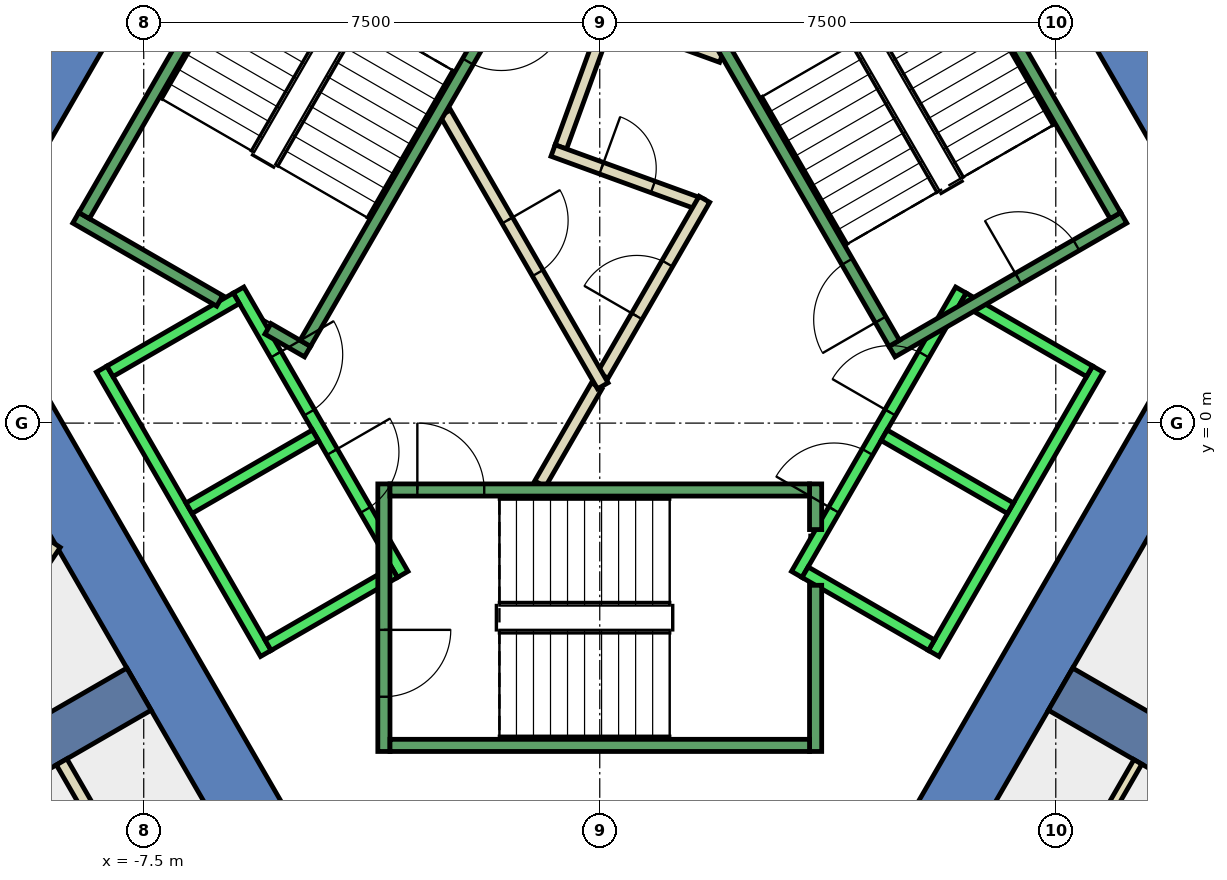
"""IFC4 building model, lengths in metres.
Left out: names, types, materials, properties, quantities, classifications, styles, units other than length and angle.
Written with IfcOpenShell. Run it as: python <this file> out.ifc"""

import sys

from ifc_helpers import new_model, si_unit, direction, frame, frame_2d, origin, place, context, subcontext, project, spatial, polyline, rectangle, outline, extrude, element, fill, save


model = new_model("IFC4")
c1 = context("Model", 3, precision=1e-05, world=origin(), true_north=direction((0.0, 1.0)))
c2 = subcontext(c1, "Body", "Model", "MODEL_VIEW")
j1 = project(units=[si_unit("LENGTHUNIT", "METRE"), si_unit("PLANEANGLEUNIT", "RADIAN")], contexts=[c1])
p1 = place(None, origin())
s1 = spatial("IfcSite", under=j1, at=p1, CompositionType="ELEMENT")
p2 = place(p1, origin())
s2 = spatial("IfcBuilding", under=s1, at=p2, CompositionType="ELEMENT")
p3 = place(p2, frame((0.0, 0.0, 273.8)))
s3 = spatial("IfcBuildingStorey", under=s2, at=p3, CompositionType="ELEMENT", Elevation=273.8)
p4 = place(p3, frame((0.0, 0.0, -0.34)))
e1 = element("IfcWall", 1, at=p4, inside=s3, PredefinedType="SHEAR", context=c2, shape_type="SweptSolid", body=[
    extrude(outline(polyline([(6.786, 10.747), (5.833, 10.197), (10.277, 2.5), (11.547, 2.5), (6.786, 10.747)])), origin(), (0.0, 0.0, 1.0), 3.6),
])
p5 = place(p3, frame((0.0, 0.0, -0.34)))
e2 = element("IfcWall", 2, at=p5, inside=s3, PredefinedType="SHEAR", context=c2, shape_type="SweptSolid", body=[
    extrude(outline(polyline([(-10.535, 4.253), (-9.583, 3.703), (-5.138, 11.4), (-5.774, 12.5), (-10.535, 4.253)])), origin(), (0.0, 0.0, 1.0), 3.6),
])
p6 = place(p3, frame((0.0, 0.0, -0.34)))
e3 = element("IfcWall", 3, at=p6, inside=s3, PredefinedType="SHEAR", context=c2, shape_type="SweptSolid", body=[
    extrude(outline(polyline([(-11.547, 2.5), (-5.774, -7.5), (-5.138, -6.4), (-10.277, 2.5), (-11.547, 2.5)])), origin(), (0.0, 0.0, 1.0), 3.6),
])
p7 = place(p3, frame((0.0, 0.0, -0.34)))
e4 = element("IfcWall", 4, at=p7, inside=s3, PredefinedType="SHEAR", context=c2, shape_type="SweptSolid", body=[
    extrude(outline(polyline([(5.774, -7.5), (11.547, 2.5), (10.277, 2.5), (5.138, -6.4), (5.774, -7.5)])), origin(), (0.0, 0.0, 1.0), 3.6),
])
for number, where, z_axis, x_axis in (
    (5, (7.578, -4.375, -0.34), (0.0, 0.0, 1.0), (0.866, -0.5, 0.0)),
    (6, (-7.578, -4.375, -0.34), (0.0, 0.0, 1.0), (-0.866, -0.5, 0.0)),
):
    element("IfcWall", number, at=place(p3, frame(where, z_axis=z_axis, x_axis=x_axis)), inside=s3, PredefinedType="SHEAR", context=c2, shape_type="SweptSolid", body=[
        extrude(rectangle(XDim=9.0, YDim=0.8, at=frame_2d((4.5, 0.0))), origin(), (0.0, 0.0, 1.0), 3.6),
    ])
p8 = place(p3, frame((2.005, 6.027, 0.0), z_axis=(0.0, 0.0, 1.0), x_axis=(-0.93978203596, 0.341774377167, 0.0)))
e7 = element("IfcWall", 7, at=p8, inside=s3, PredefinedType="PARTITIONING", context=c2, shape_type="SweptSolid", body=[
    extrude(rectangle(XDim=1.878, YDim=0.2, at=frame_2d((0.939, 0.0))), origin(), (0.0, 0.0, 1.0), 3.26),
])
p9 = place(p3, frame((0.181, 6.797, 0.0), z_axis=(0.0, 0.0, 1.0), x_axis=(-0.342020767299, -0.939692393678, 0.0)))
e8 = element("IfcWall", 8, at=p9, inside=s3, PredefinedType="PARTITIONING", context=c2, shape_type="SweptSolid", body=[
    extrude(rectangle(XDim=2.4, YDim=0.2, at=frame_2d((1.2, 0.0))), origin(), (0.0, 0.0, 1.0), 3.26),
])
p10 = place(p3, frame((-0.768, 4.482, 0.0), z_axis=(0.0, 0.0, 1.0), x_axis=(0.939664280748, -0.342097996905, 0.0)))
e9 = element("IfcWall", 9, at=p10, inside=s3, PredefinedType="PARTITIONING", context=c2, shape_type="SweptSolid", body=[
    extrude(rectangle(XDim=2.595, YDim=0.2, at=frame_2d((1.298, 0.0))), origin(), (0.0, 0.0, 1.0), 3.26),
])
p11 = place(p10, frame((0.848, 0.0, 0.0)))
e10 = element("IfcOpeningElement", 10, at=p11, cuts=e9, PredefinedType="OPENING", context=c2, shape_type="SweptSolid", body=[
    extrude(rectangle(XDim=0.9, YDim=2.1, at=frame_2d((0.45, 1.05))), frame((0.0, 0.11, 0.0), z_axis=(0.0, -1.0, 0.0), x_axis=(1.0, 0.0, 0.0)), (0.0, 0.0, 1.0), 0.22),
])
p12 = place(p3, frame((-10.028, -3.575, 0.0), z_axis=(0.0, 0.0, 1.0), x_axis=(0.559779346026, 0.828641710127, 0.0)))
e11 = element("IfcWall", 11, at=p12, inside=s3, PredefinedType="PARTITIONING", context=c2, shape_type="SweptSolid", body=[
    extrude(rectangle(XDim=1.915, YDim=0.2, at=frame_2d((0.958, 0.0))), origin(), (0.0, 0.0, 1.0), 3.26),
])
p13 = place(p3, frame((7.8, -7.39, 0.0), z_axis=(0.0, 0.0, 1.0), x_axis=(0.499977374825, 0.866038466041, 0.0)))
e12 = element("IfcWall", 12, at=p13, inside=s3, PredefinedType="PARTITIONING", context=c2, shape_type="SweptSolid", body=[
    extrude(rectangle(XDim=2.1, YDim=0.15, at=frame_2d((1.05, 0.0))), origin(), (0.0, 0.0, 1.0), 3.26),
])
p14 = place(p3, frame((-0.982, -1.0, 0.0), z_axis=(0.0, 0.0, 1.0), x_axis=(0.50024047865, 0.865886518847, 0.0)))
e13 = element("IfcWall", 13, at=p14, inside=s3, PredefinedType="PARTITIONING", context=c2, shape_type="SweptSolid", body=[
    extrude(rectangle(XDim=1.863, YDim=0.2, at=frame_2d((0.931, 0.0))), origin(), (0.0, 0.0, 1.0), 3.26),
])
p15 = place(p3, frame((0.05, 0.787, 0.0), z_axis=(0.0, 0.0, 1.0), x_axis=(0.500036563046, 0.866004293071, 0.0)))
e14 = element("IfcWall", 14, at=p15, inside=s3, PredefinedType="PARTITIONING", context=c2, shape_type="SweptSolid", body=[
    extrude(rectangle(XDim=3.342, YDim=0.2, at=frame_2d((1.671, 0.0))), origin(), (0.0, 0.0, 1.0), 3.26),
])
p16 = place(p15, frame((1.121, 0.0, 0.0)))
e15 = element("IfcOpeningElement", 15, at=p16, cuts=e14, PredefinedType="OPENING", context=c2, shape_type="SweptSolid", body=[
    extrude(rectangle(XDim=1.0, YDim=2.1, at=frame_2d((0.5, 1.05))), frame((0.0, 0.11, 0.0), z_axis=(0.0, -1.0, 0.0), x_axis=(1.0, 0.0, 0.0)), (0.0, 0.0, 1.0), 0.22),
])
p17 = place(p3, frame((-2.54, 5.1, 0.0), z_axis=(0.0, 0.0, 1.0), x_axis=(0.499925051871, -0.866068670783, 0.0)))
e16 = element("IfcWall", 16, at=p17, inside=s3, PredefinedType="PARTITIONING", context=c2, shape_type="SweptSolid", body=[
    extrude(rectangle(XDim=5.181, YDim=0.2, at=frame_2d((2.59, 0.0))), origin(), (0.0, 0.0, 1.0), 3.26),
])
p18 = place(p17, frame((2.04, 0.0, 0.0)))
e17 = element("IfcOpeningElement", 17, at=p18, cuts=e16, PredefinedType="OPENING", context=c2, shape_type="SweptSolid", body=[
    extrude(rectangle(XDim=1.0, YDim=2.1, at=frame_2d((0.5, 1.05))), frame((0.0, 0.11, 0.0), z_axis=(0.0, -1.0, 0.0), x_axis=(1.0, 0.0, 0.0)), (0.0, 0.0, 1.0), 0.22),
])
p19 = place(p3, frame((-7.8, -7.39, 0.0), z_axis=(0.0, 0.0, 1.0), x_axis=(-0.499977374825, 0.866038466041, 0.0)))
e18 = element("IfcWall", 18, at=p19, inside=s3, PredefinedType="PARTITIONING", context=c2, shape_type="SweptSolid", body=[
    extrude(rectangle(XDim=2.1, YDim=0.2, at=frame_2d((1.05, 0.0))), origin(), (0.0, 0.0, 1.0), 3.26),
])
p20 = place(p3, frame((-5.94, 2.188, 0.0), z_axis=(0.0, 0.0, 1.0), x_axis=(0.500034260056, -0.866005622828, 0.0)))
e19 = element("IfcWall", 19, at=p20, inside=s3, PredefinedType="STANDARD", context=c2, shape_type="SweptSolid", body=[
    extrude(rectangle(XDim=5.399, YDim=0.2, at=frame_2d((2.7, 0.0))), origin(), (0.0, 0.0, 1.0), 3.26),
])
p21 = place(p20, frame((3.075, 0.0, 0.0)))
e20 = element("IfcOpeningElement", 20, at=p21, cuts=e19, PredefinedType="OPENING", context=c2, shape_type="SweptSolid", body=[
    extrude(rectangle(XDim=1.1, YDim=2.1, at=frame_2d((0.55, 1.05))), frame((0.0, 0.11, 0.0), z_axis=(0.0, -1.0, 0.0), x_axis=(1.0, 0.0, 0.0)), (0.0, 0.0, 1.0), 0.22),
])
p22 = place(p20, frame((1.225, 0.0, 0.0)))
e21 = element("IfcOpeningElement", 21, at=p22, cuts=e19, PredefinedType="OPENING", context=c2, shape_type="SweptSolid", body=[
    extrude(rectangle(XDim=1.1, YDim=2.1, at=frame_2d((0.55, 1.05))), frame((0.0, 0.11, 0.0), z_axis=(0.0, -1.0, 0.0), x_axis=(1.0, 0.0, 0.0)), (0.0, 0.0, 1.0), 0.22),
])
p23 = place(p3, frame((-8.192, 0.888, 0.0), z_axis=(0.0, 0.0, 1.0), x_axis=(0.500034260056, -0.866005622828, 0.0)))
e22 = element("IfcWall", 22, at=p23, inside=s3, PredefinedType="STANDARD", context=c2, shape_type="SweptSolid", body=[
    extrude(rectangle(XDim=5.399, YDim=0.2, at=frame_2d((2.7, 0.0))), origin(), (0.0, 0.0, 1.0), 3.26),
])
for number, where, z_axis, x_axis in (
    (23, (-5.977, 2.052, 0.0), (0.0, 0.0, 1.0), (-0.866, -0.5, 0.0)),
    (24, (-4.677, -0.2, 0.0), (0.0, 0.0, 1.0), (-0.866, -0.5, 0.0)),
):
    element("IfcWall", number, at=place(p3, frame(where, z_axis=z_axis, x_axis=x_axis)), inside=s3, PredefinedType="STANDARD", context=c2, shape_type="SweptSolid", body=[
        extrude(rectangle(XDim=2.399, YDim=0.2, at=frame_2d((1.2, 0.0))), origin(), (0.0, 0.0, 1.0), 3.26),
    ])
p24 = place(p3, frame((-3.377, -2.452, 0.0), z_axis=(0.0, 0.0, 1.0), x_axis=(-0.865955154139, -0.50012165622, 0.0)))
e25 = element("IfcWall", 25, at=p24, inside=s3, PredefinedType="STANDARD", context=c2, shape_type="SweptSolid", body=[
    extrude(rectangle(XDim=2.4, YDim=0.2, at=frame_2d((1.2, 0.0))), origin(), (0.0, 0.0, 1.0), 3.26),
])
p25 = place(p3, frame((3.24, -2.488, 0.0), z_axis=(0.0, 0.0, 1.0), x_axis=(0.500034260056, 0.866005622828, 0.0)))
e26 = element("IfcWall", 26, at=p25, inside=s3, PredefinedType="STANDARD", context=c2, shape_type="SweptSolid", body=[
    extrude(rectangle(XDim=5.399, YDim=0.2, at=frame_2d((2.7, 0.0))), origin(), (0.0, 0.0, 1.0), 3.26),
])
p26 = place(p25, frame((3.075, 0.0, 0.0)))
e27 = element("IfcOpeningElement", 27, at=p26, cuts=e26, PredefinedType="OPENING", context=c2, shape_type="SweptSolid", body=[
    extrude(rectangle(XDim=1.1, YDim=2.1, at=frame_2d((0.55, 1.05))), frame((0.0, 0.11, 0.0), z_axis=(0.0, -1.0, 0.0), x_axis=(1.0, 0.0, 0.0)), (0.0, 0.0, 1.0), 0.22),
])
p27 = place(p25, frame((1.225, 0.0, 0.0)))
e28 = element("IfcOpeningElement", 28, at=p27, cuts=e26, PredefinedType="OPENING", context=c2, shape_type="SweptSolid", body=[
    extrude(rectangle(XDim=1.1, YDim=2.1, at=frame_2d((0.55, 1.05))), frame((0.0, 0.11, 0.0), z_axis=(0.0, -1.0, 0.0), x_axis=(1.0, 0.0, 0.0)), (0.0, 0.0, 1.0), 0.22),
])
p28 = place(p3, frame((5.492, -3.788, 0.0), z_axis=(0.0, 0.0, 1.0), x_axis=(0.500034260056, 0.866005622828, 0.0)))
e29 = element("IfcWall", 29, at=p28, inside=s3, PredefinedType="STANDARD", context=c2, shape_type="SweptSolid", body=[
    extrude(rectangle(XDim=5.399, YDim=0.2, at=frame_2d((2.7, 0.0))), origin(), (0.0, 0.0, 1.0), 3.26),
])
p29 = place(p3, frame((3.377, -2.452, 0.0), z_axis=(0.0, 0.0, 1.0), x_axis=(0.865955154139, -0.50012165622, 0.0)))
e30 = element("IfcWall", 30, at=p29, inside=s3, PredefinedType="STANDARD", context=c2, shape_type="SweptSolid", body=[
    extrude(rectangle(XDim=2.4, YDim=0.2, at=frame_2d((1.2, 0.0))), origin(), (0.0, 0.0, 1.0), 3.26),
])
for number, where, z_axis, x_axis in (
    (31, (4.677, -0.2, 0.0), (0.0, 0.0, 1.0), (0.866, -0.5, 0.0)),
    (32, (5.977, 2.052, 0.0), (0.0, 0.0, 1.0), (0.866, -0.5, 0.0)),
):
    element("IfcWall", number, at=place(p3, frame(where, z_axis=z_axis, x_axis=x_axis)), inside=s3, PredefinedType="STANDARD", context=c2, shape_type="SweptSolid", body=[
        extrude(rectangle(XDim=2.399, YDim=0.2, at=frame_2d((1.2, 0.0))), origin(), (0.0, 0.0, 1.0), 3.26),
    ])
p30 = place(p3, frame((-3.55, -1.0, 0.0), z_axis=(0.0, 0.0, 1.0), x_axis=(0.0, -1.0, 0.0)))
e33 = element("IfcWall", 33, at=p30, inside=s3, PredefinedType="STANDARD", context=c2, shape_type="SweptSolid", body=[
    extrude(rectangle(XDim=4.4, YDim=0.2, at=frame_2d((2.2, 0.0))), origin(), (0.0, 0.0, 1.0), 3.26),
])
p31 = place(p30, frame((2.4, 0.0, 0.0)))
e34 = element("IfcOpeningElement", 34, at=p31, cuts=e33, PredefinedType="OPENING", context=c2, shape_type="SweptSolid", body=[
    extrude(rectangle(XDim=1.1, YDim=2.2, at=frame_2d((0.55, 1.1))), frame((0.0, 0.11, 0.0), z_axis=(0.0, -1.0, 0.0), x_axis=(1.0, 0.0, 0.0)), (0.0, 0.0, 1.0), 0.22),
])
p32 = place(p3, frame((3.55, -2.667, 0.0), z_axis=(0.0, 0.0, 1.0), x_axis=(0.0, -1.0, 0.0)))
e35 = element("IfcWall", 35, at=p32, inside=s3, PredefinedType="STANDARD", context=c2, shape_type="SweptSolid", body=[
    extrude(rectangle(XDim=2.733, YDim=0.2, at=frame_2d((1.366, 0.0))), origin(), (0.0, 0.0, 1.0), 3.26),
])
p33 = place(p3, frame((3.55, -1.0, 0.0), z_axis=(0.0, 0.0, 1.0), x_axis=(0.0, -1.0, 0.0)))
e36 = element("IfcWall", 36, at=p33, inside=s3, PredefinedType="STANDARD", context=c2, shape_type="SweptSolid", body=[
    extrude(rectangle(XDim=0.751, YDim=0.2, at=frame_2d((0.375, 0.0))), origin(), (0.0, 0.0, 1.0), 3.26),
])
p34 = place(p3, frame((-3.45, -1.1, 0.0), z_axis=(0.0, 0.0, 1.0), x_axis=(1.0, 0.0, 0.0)))
e37 = element("IfcWall", 37, at=p34, inside=s3, PredefinedType="STANDARD", context=c2, shape_type="SweptSolid", body=[
    extrude(rectangle(XDim=6.9, YDim=0.2, at=frame_2d((3.45, 0.0))), origin(), (0.0, 0.0, 1.0), 3.26),
])
p35 = place(p34, frame((0.45, 0.0, 0.0)))
e38 = element("IfcOpeningElement", 38, at=p35, cuts=e37, PredefinedType="OPENING", context=c2, shape_type="SweptSolid", body=[
    extrude(rectangle(XDim=1.1, YDim=2.2, at=frame_2d((0.55, 1.1))), frame((0.0, 0.11, 0.0), z_axis=(0.0, -1.0, 0.0), x_axis=(1.0, 0.0, 0.0)), (0.0, 0.0, 1.0), 0.22),
])
p36 = place(p3, frame((-3.45, -5.3, 0.0), z_axis=(0.0, 0.0, 1.0), x_axis=(1.0, 0.0, 0.0)))
e39 = element("IfcWall", 39, at=p36, inside=s3, PredefinedType="STANDARD", context=c2, shape_type="SweptSolid", body=[
    extrude(rectangle(XDim=6.9, YDim=0.2, at=frame_2d((3.45, 0.0))), origin(), (0.0, 0.0, 1.0), 3.26),
])
p37 = place(p3, frame((4.806, 1.176, 0.0), z_axis=(0.0, 0.0, 1.0), x_axis=(0.866059941101, 0.499940174841, 0.0)))
e40 = element("IfcWall", 40, at=p37, inside=s3, PredefinedType="STANDARD", context=c2, shape_type="SweptSolid", body=[
    extrude(rectangle(XDim=4.4, YDim=0.2, at=frame_2d((2.2, 0.0))), origin(), (0.0, 0.0, 1.0), 3.26),
])
p38 = place(p37, frame((2.4, 0.0, 0.0)))
e41 = element("IfcOpeningElement", 41, at=p38, cuts=e40, PredefinedType="OPENING", context=c2, shape_type="SweptSolid", body=[
    extrude(rectangle(XDim=1.1, YDim=2.2, at=frame_2d((0.55, 1.1))), frame((0.0, 0.11, 0.0), z_axis=(0.0, -1.0, 0.0), x_axis=(1.0, 0.0, 0.0)), (0.0, 0.0, 1.0), 0.22),
])
p39 = place(p3, frame((4.843, 1.312, 0.0), z_axis=(0.0, 0.0, 1.0), x_axis=(-0.499963383562, 0.866046543262, 0.0)))
e42 = element("IfcWall", 42, at=p39, inside=s3, PredefinedType="STANDARD", context=c2, shape_type="SweptSolid", body=[
    extrude(rectangle(XDim=6.9, YDim=0.2, at=frame_2d((3.45, 0.0))), origin(), (0.0, 0.0, 1.0), 3.26),
])
p40 = place(p39, frame((0.45, 0.0, 0.0)))
e43 = element("IfcOpeningElement", 43, at=p40, cuts=e42, PredefinedType="OPENING", context=c2, shape_type="SweptSolid", body=[
    extrude(rectangle(XDim=1.1, YDim=2.2, at=frame_2d((0.55, 1.1))), frame((0.0, 0.11, 0.0), z_axis=(0.0, -1.0, 0.0), x_axis=(1.0, 0.0, 0.0)), (0.0, 0.0, 1.0), 0.22),
])
p41 = place(p3, frame((8.48, 3.412, 0.0), z_axis=(0.0, 0.0, 1.0), x_axis=(-0.499978703459, 0.866037698999, 0.0)))
e44 = element("IfcWall", 44, at=p41, inside=s3, PredefinedType="STANDARD", context=c2, shape_type="SweptSolid", body=[
    extrude(rectangle(XDim=6.9, YDim=0.2, at=frame_2d((3.45, 0.0))), origin(), (0.0, 0.0, 1.0), 3.26),
])
p42 = place(p3, frame((-6.25, 2.01, 0.0), z_axis=(0.0, 0.0, 1.0), x_axis=(-0.86611865017, 0.499838457731, 0.0)))
e45 = element("IfcWall", 45, at=p42, inside=s3, PredefinedType="STANDARD", context=c2, shape_type="SweptSolid", body=[
    extrude(rectangle(XDim=2.733, YDim=0.2, at=frame_2d((1.366, 0.0))), origin(), (0.0, 0.0, 1.0), 3.26),
])
p43 = place(p3, frame((-4.806, 1.176, 0.0), z_axis=(0.0, 0.0, 1.0), x_axis=(-0.866558586415, 0.499075361355, 0.0)))
e46 = element("IfcWall", 46, at=p43, inside=s3, PredefinedType="STANDARD", context=c2, shape_type="SweptSolid", body=[
    extrude(rectangle(XDim=0.751, YDim=0.2, at=frame_2d((0.376, 0.0))), origin(), (0.0, 0.0, 1.0), 3.26),
])
p44 = place(p3, frame((-1.393, 7.288, 0.0), z_axis=(0.0, 0.0, 1.0), x_axis=(-0.499963383562, -0.866046543262, 0.0)))
e47 = element("IfcWall", 47, at=p44, inside=s3, PredefinedType="STANDARD", context=c2, shape_type="SweptSolid", body=[
    extrude(rectangle(XDim=6.9, YDim=0.2, at=frame_2d((3.45, 0.0))), origin(), (0.0, 0.0, 1.0), 3.26),
])
p45 = place(p44, frame((0.45, 0.0, 0.0)))
e48 = element("IfcOpeningElement", 48, at=p45, cuts=e47, PredefinedType="OPENING", context=c2, shape_type="SweptSolid", body=[
    extrude(rectangle(XDim=1.1, YDim=2.2, at=frame_2d((0.55, 1.1))), frame((0.0, 0.11, 0.0), z_axis=(0.0, -1.0, 0.0), x_axis=(1.0, 0.0, 0.0)), (0.0, 0.0, 1.0), 0.22),
])
p46 = place(p3, frame((-5.03, 9.388, 0.0), z_axis=(0.0, 0.0, 1.0), x_axis=(-0.499978703459, -0.866037698999, 0.0)))
e49 = element("IfcWall", 49, at=p46, inside=s3, PredefinedType="STANDARD", context=c2, shape_type="SweptSolid", body=[
    extrude(rectangle(XDim=6.9, YDim=0.2, at=frame_2d((3.45, 0.0))), origin(), (0.0, 0.0, 1.0), 3.26),
])
p47 = place(p16, origin())
e50 = element("IfcDoor", 50, at=p47, inside=s3, OperationType="SINGLE_SWING_LEFT", PredefinedType="DOOR", context=c2, shape_type="SweptSolid", body=[
    extrude(rectangle(XDim=1.0, YDim=2.1, at=frame_2d((0.5, 1.05))), frame((0.0, 0.025, 0.0), z_axis=(0.0, -1.0, 0.0), x_axis=(1.0, 0.0, 0.0)), (0.0, 0.0, 1.0), 0.05),
])
fill(e15, e50)
p48 = place(p18, origin())
e51 = element("IfcDoor", 51, at=p48, inside=s3, OperationType="SINGLE_SWING_LEFT", PredefinedType="DOOR", context=c2, shape_type="SweptSolid", body=[
    extrude(rectangle(XDim=1.0, YDim=2.1, at=frame_2d((0.5, 1.05))), frame((0.0, 0.025, 0.0), z_axis=(0.0, -1.0, 0.0), x_axis=(1.0, 0.0, 0.0)), (0.0, 0.0, 1.0), 0.05),
])
fill(e17, e51)
p49 = place(p11, origin())
e52 = element("IfcDoor", 52, at=p49, inside=s3, OperationType="SINGLE_SWING_LEFT", PredefinedType="DOOR", context=c2, shape_type="SweptSolid", body=[
    extrude(rectangle(XDim=0.9, YDim=2.1, at=frame_2d((0.45, 1.05))), frame((0.0, 0.025, 0.0), z_axis=(0.0, -1.0, 0.0), x_axis=(1.0, 0.0, 0.0)), (0.0, 0.0, 1.0), 0.05),
])
fill(e10, e52)
p50 = place(p26, origin())
e53 = element("IfcDoor", 53, at=p50, inside=s3, OperationType="SLIDING_TO_LEFT", PredefinedType="DOOR", context=c2, shape_type="SweptSolid", body=[
    extrude(rectangle(XDim=1.1, YDim=2.1, at=frame_2d((0.55, 1.05))), frame((0.0, 0.025, 0.0), z_axis=(0.0, -1.0, 0.0), x_axis=(1.0, 0.0, 0.0)), (0.0, 0.0, 1.0), 0.05),
])
fill(e27, e53)
p51 = place(p21, origin())
e54 = element("IfcDoor", 54, at=p51, inside=s3, OperationType="SLIDING_TO_LEFT", PredefinedType="DOOR", context=c2, shape_type="SweptSolid", body=[
    extrude(rectangle(XDim=1.1, YDim=2.1, at=frame_2d((0.55, 1.05))), frame((0.0, 0.025, 0.0), z_axis=(0.0, -1.0, 0.0), x_axis=(1.0, 0.0, 0.0)), (0.0, 0.0, 1.0), 0.05),
])
fill(e20, e54)
p52 = place(p27, origin())
e55 = element("IfcDoor", 55, at=p52, inside=s3, OperationType="SLIDING_TO_LEFT", PredefinedType="DOOR", context=c2, shape_type="SweptSolid", body=[
    extrude(rectangle(XDim=1.1, YDim=2.1, at=frame_2d((0.55, 1.05))), frame((0.0, 0.025, 0.0), z_axis=(0.0, -1.0, 0.0), x_axis=(1.0, 0.0, 0.0)), (0.0, 0.0, 1.0), 0.05),
])
fill(e28, e55)
p53 = place(p22, origin())
e56 = element("IfcDoor", 56, at=p53, inside=s3, OperationType="SLIDING_TO_LEFT", PredefinedType="DOOR", context=c2, shape_type="SweptSolid", body=[
    extrude(rectangle(XDim=1.1, YDim=2.1, at=frame_2d((0.55, 1.05))), frame((0.0, 0.025, 0.0), z_axis=(0.0, -1.0, 0.0), x_axis=(1.0, 0.0, 0.0)), (0.0, 0.0, 1.0), 0.05),
])
fill(e21, e56)
p54 = place(p35, origin())
e57 = element("IfcDoor", 57, at=p54, inside=s3, OperationType="SINGLE_SWING_LEFT", PredefinedType="DOOR", context=c2, shape_type="SweptSolid", body=[
    extrude(rectangle(XDim=1.1, YDim=2.2, at=frame_2d((0.55, 1.1))), frame((0.0, 0.025, 0.0), z_axis=(0.0, -1.0, 0.0), x_axis=(1.0, 0.0, 0.0)), (0.0, 0.0, 1.0), 0.05),
])
fill(e38, e57)
p55 = place(p31, origin())
e58 = element("IfcDoor", 58, at=p55, inside=s3, OperationType="SINGLE_SWING_LEFT", PredefinedType="DOOR", context=c2, shape_type="SweptSolid", body=[
    extrude(rectangle(XDim=1.1, YDim=2.2, at=frame_2d((0.55, 1.1))), frame((0.0, 0.025, 0.0), z_axis=(0.0, -1.0, 0.0), x_axis=(1.0, 0.0, 0.0)), (0.0, 0.0, 1.0), 0.05),
])
fill(e34, e58)
p56 = place(p40, origin())
e59 = element("IfcDoor", 59, at=p56, inside=s3, OperationType="SINGLE_SWING_LEFT", PredefinedType="DOOR", context=c2, shape_type="SweptSolid", body=[
    extrude(rectangle(XDim=1.1, YDim=2.2, at=frame_2d((0.55, 1.1))), frame((0.0, 0.025, 0.0), z_axis=(0.0, -1.0, 0.0), x_axis=(1.0, 0.0, 0.0)), (0.0, 0.0, 1.0), 0.05),
])
fill(e43, e59)
p57 = place(p38, origin())
e60 = element("IfcDoor", 60, at=p57, inside=s3, OperationType="SINGLE_SWING_LEFT", PredefinedType="DOOR", context=c2, shape_type="SweptSolid", body=[
    extrude(rectangle(XDim=1.1, YDim=2.2, at=frame_2d((0.55, 1.1))), frame((0.0, 0.025, 0.0), z_axis=(0.0, -1.0, 0.0), x_axis=(1.0, 0.0, 0.0)), (0.0, 0.0, 1.0), 0.05),
])
fill(e41, e60)
p58 = place(p45, origin())
e61 = element("IfcDoor", 61, at=p58, inside=s3, OperationType="SINGLE_SWING_LEFT", PredefinedType="DOOR", context=c2, shape_type="SweptSolid", body=[
    extrude(rectangle(XDim=1.1, YDim=2.2, at=frame_2d((0.55, 1.1))), frame((0.0, 0.025, 0.0), z_axis=(0.0, -1.0, 0.0), x_axis=(1.0, 0.0, 0.0)), (0.0, 0.0, 1.0), 0.05),
])
fill(e48, e61)
save(model, sys.argv[1])
